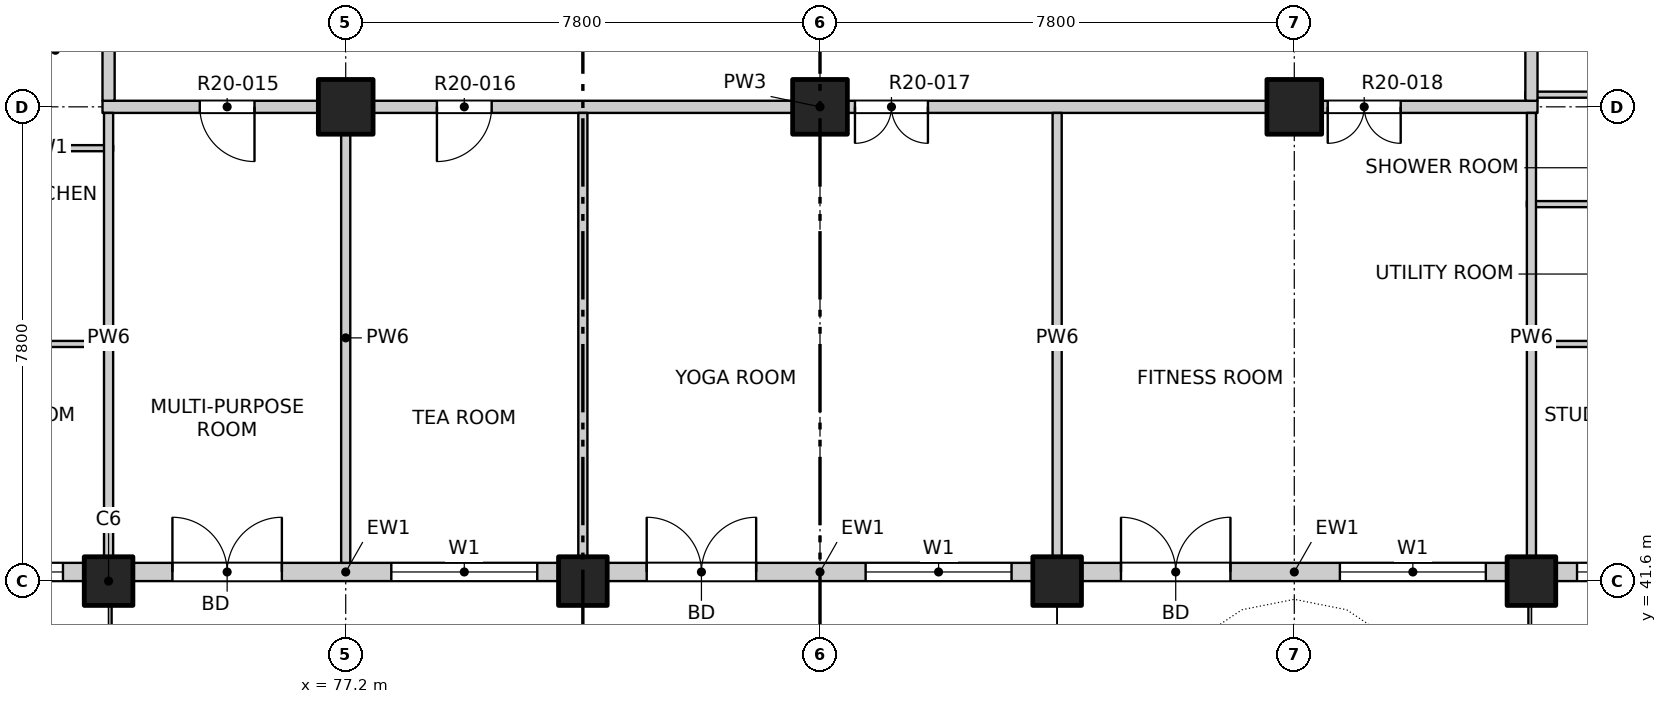
"""IFC4 building model, lengths in metres.
Left out: names, types, materials, properties, quantities, classifications, styles, units other than length and angle.
Written with IfcOpenShell. Run it as: python <this file> out.ifc"""

import sys

from ifc_helpers import new_model, si_unit, direction, frame, frame_2d, origin, origin_2d, place, context, subcontext, project, spatial, rectangle, extrude, element, fill, save


model = new_model("IFC4")
c1 = context("Model", 3, precision=1e-05, world=origin(), true_north=direction((0.0, 1.0)))
c2 = subcontext(c1, "Body", "Model", "MODEL_VIEW")
j1 = project(units=[si_unit("LENGTHUNIT", "METRE"), si_unit("PLANEANGLEUNIT", "RADIAN")], contexts=[c1])
p1 = place(None, origin())
s1 = spatial("IfcSite", under=j1, at=p1, CompositionType="ELEMENT")
p2 = place(p1, origin())
s2 = spatial("IfcBuilding", under=s1, at=p2, CompositionType="ELEMENT")
p3 = place(p2, frame((0.0, 0.0, 210.9)))
s3 = spatial("IfcBuildingStorey", under=s2, at=p3, CompositionType="ELEMENT", Elevation=210.9)
for number, where, z_axis, x_axis in (
    (1, (73.3, 41.6, -0.25), (0.0, 0.0, 1.0), (1.0, 0.0, 0.0)),
    (2, (81.1, 41.6, -0.25), (0.0, 0.0, 1.0), (1.0, 0.0, 0.0)),
    (3, (88.9, 41.6, -0.25), (0.0, 0.0, 1.0), (1.0, 0.0, 0.0)),
    (4, (96.7, 41.6, -0.25), (0.0, 0.0, 1.0), (1.0, 0.0, 0.0)),
):
    element("IfcColumn", number, at=place(p3, frame(where, z_axis=z_axis, x_axis=x_axis)), inside=s3, PredefinedType="COLUMN", context=c2, shape_type="SweptSolid", body=[
        extrude(rectangle(XDim=0.8, YDim=0.8, at=origin_2d()), origin(), (0.0, 0.0, 1.0), 3.4),
    ])
for number, where, z_axis, x_axis in (
    (5, (77.2, 49.4, -0.25), (0.0, 0.0, 1.0), (1.0, 0.0, 0.0)),
    (6, (85.0, 49.4, -0.25), (0.0, 0.0, 1.0), (1.0, 0.0, 0.0)),
    (7, (92.8, 49.4, -0.25), (0.0, 0.0, 1.0), (1.0, 0.0, 0.0)),
):
    element("IfcColumn", number, at=place(p3, frame(where, z_axis=z_axis, x_axis=x_axis)), inside=s3, PredefinedType="COLUMN", context=c2, shape_type="SweptSolid", body=[
        extrude(rectangle(XDim=0.9, YDim=0.9, at=origin_2d()), origin(), (0.0, 0.0, 1.0), 3.4),
    ])
p4 = place(p3, frame((65.5, 41.75, 0.0), z_axis=(0.0, 0.0, 1.0), x_axis=(1.0, 0.0, 0.0)))
e8 = element("IfcWall", 8, at=p4, inside=s3, PredefinedType="SOLIDWALL", context=c2, shape_type="SweptSolid", body=[
    extrude(rectangle(XDim=7.4, YDim=0.3, at=frame_2d((3.7, 0.0))), origin(), (0.0, 0.0, 1.0), 2.7),
])
p5 = place(p4, frame((0.75, 0.0, 0.9)))
e9 = element("IfcOpeningElement", 9, at=p5, cuts=e8, PredefinedType="OPENING", context=c2, shape_type="SweptSolid", body=[
    extrude(rectangle(XDim=2.4, YDim=1.8, at=frame_2d((1.2, 0.9))), frame((0.0, 0.16, 0.0), z_axis=(0.0, -1.0, 0.0), x_axis=(1.0, 0.0, 0.0)), (0.0, 0.0, 1.0), 0.32),
])
p6 = place(p4, frame((4.65, 0.0, 0.9)))
e10 = element("IfcOpeningElement", 10, at=p6, cuts=e8, PredefinedType="OPENING", context=c2, shape_type="SweptSolid", body=[
    extrude(rectangle(XDim=2.4, YDim=1.8, at=frame_2d((1.2, 0.9))), frame((0.0, 0.16, 0.0), z_axis=(0.0, -1.0, 0.0), x_axis=(1.0, 0.0, 0.0)), (0.0, 0.0, 1.0), 0.32),
])
p7 = place(p3, frame((73.7, 41.75, 0.0), z_axis=(0.0, 0.0, 1.0), x_axis=(1.0, 0.0, 0.0)))
e11 = element("IfcWall", 11, at=p7, inside=s3, PredefinedType="SOLIDWALL", context=c2, shape_type="SweptSolid", body=[
    extrude(rectangle(XDim=7.0, YDim=0.3, at=frame_2d((3.5, 0.0))), origin(), (0.0, 0.0, 1.0), 2.7),
])
p8 = place(p7, frame((0.65, 0.0, 0.0)))
e12 = element("IfcOpeningElement", 12, at=p8, cuts=e11, PredefinedType="OPENING", context=c2, shape_type="SweptSolid", body=[
    extrude(rectangle(XDim=1.8, YDim=2.4, at=frame_2d((0.9, 1.2))), frame((0.0, 0.16, 0.0), z_axis=(0.0, -1.0, 0.0), x_axis=(1.0, 0.0, 0.0)), (0.0, 0.0, 1.0), 0.32),
])
p9 = place(p7, frame((4.25, 0.0, 0.9)))
e13 = element("IfcOpeningElement", 13, at=p9, cuts=e11, PredefinedType="OPENING", context=c2, shape_type="SweptSolid", body=[
    extrude(rectangle(XDim=2.4, YDim=1.8, at=frame_2d((1.2, 0.9))), frame((0.0, 0.16, 0.0), z_axis=(0.0, -1.0, 0.0), x_axis=(1.0, 0.0, 0.0)), (0.0, 0.0, 1.0), 0.32),
])
p10 = place(p3, frame((81.5, 41.75, 0.0), z_axis=(0.0, 0.0, 1.0), x_axis=(1.0, 0.0, 0.0)))
e14 = element("IfcWall", 14, at=p10, inside=s3, PredefinedType="SOLIDWALL", context=c2, shape_type="SweptSolid", body=[
    extrude(rectangle(XDim=7.0, YDim=0.3, at=frame_2d((3.5, 0.0))), origin(), (0.0, 0.0, 1.0), 2.7),
])
p11 = place(p10, frame((0.65, 0.0, 0.0)))
e15 = element("IfcOpeningElement", 15, at=p11, cuts=e14, PredefinedType="OPENING", context=c2, shape_type="SweptSolid", body=[
    extrude(rectangle(XDim=1.8, YDim=2.4, at=frame_2d((0.9, 1.2))), frame((0.0, 0.16, 0.0), z_axis=(0.0, -1.0, 0.0), x_axis=(1.0, 0.0, 0.0)), (0.0, 0.0, 1.0), 0.32),
])
p12 = place(p10, frame((4.25, 0.0, 0.9)))
e16 = element("IfcOpeningElement", 16, at=p12, cuts=e14, PredefinedType="OPENING", context=c2, shape_type="SweptSolid", body=[
    extrude(rectangle(XDim=2.4, YDim=1.8, at=frame_2d((1.2, 0.9))), frame((0.0, 0.16, 0.0), z_axis=(0.0, -1.0, 0.0), x_axis=(1.0, 0.0, 0.0)), (0.0, 0.0, 1.0), 0.32),
])
p13 = place(p3, frame((89.3, 41.75, 0.0), z_axis=(0.0, 0.0, 1.0), x_axis=(1.0, 0.0, 0.0)))
e17 = element("IfcWall", 17, at=p13, inside=s3, PredefinedType="SOLIDWALL", context=c2, shape_type="SweptSolid", body=[
    extrude(rectangle(XDim=7.0, YDim=0.3, at=frame_2d((3.5, 0.0))), origin(), (0.0, 0.0, 1.0), 2.7),
])
p14 = place(p13, frame((0.65, 0.0, 0.0)))
e18 = element("IfcOpeningElement", 18, at=p14, cuts=e17, PredefinedType="OPENING", context=c2, shape_type="SweptSolid", body=[
    extrude(rectangle(XDim=1.8, YDim=2.4, at=frame_2d((0.9, 1.2))), frame((0.0, 0.16, 0.0), z_axis=(0.0, -1.0, 0.0), x_axis=(1.0, 0.0, 0.0)), (0.0, 0.0, 1.0), 0.32),
])
p15 = place(p13, frame((4.25, 0.0, 0.9)))
e19 = element("IfcOpeningElement", 19, at=p15, cuts=e17, PredefinedType="OPENING", context=c2, shape_type="SweptSolid", body=[
    extrude(rectangle(XDim=2.4, YDim=1.8, at=frame_2d((1.2, 0.9))), frame((0.0, 0.16, 0.0), z_axis=(0.0, -1.0, 0.0), x_axis=(1.0, 0.0, 0.0)), (0.0, 0.0, 1.0), 0.32),
])
p16 = place(p3, frame((97.1, 41.75, 0.0), z_axis=(0.0, 0.0, 1.0), x_axis=(1.0, 0.0, 0.0)))
e20 = element("IfcWall", 20, at=p16, inside=s3, PredefinedType="SOLIDWALL", context=c2, shape_type="SweptSolid", body=[
    extrude(rectangle(XDim=7.4, YDim=0.3, at=frame_2d((3.7, 0.0))), origin(), (0.0, 0.0, 1.0), 2.7),
])
p17 = place(p16, frame((0.35, 0.0, 0.9)))
e21 = element("IfcOpeningElement", 21, at=p17, cuts=e20, PredefinedType="OPENING", context=c2, shape_type="SweptSolid", body=[
    extrude(rectangle(XDim=2.4, YDim=1.8, at=frame_2d((1.2, 0.9))), frame((0.0, 0.16, 0.0), z_axis=(0.0, -1.0, 0.0), x_axis=(1.0, 0.0, 0.0)), (0.0, 0.0, 1.0), 0.32),
])
p18 = place(p16, frame((4.25, 0.0, 0.9)))
e22 = element("IfcOpeningElement", 22, at=p18, cuts=e20, PredefinedType="OPENING", context=c2, shape_type="SweptSolid", body=[
    extrude(rectangle(XDim=2.4, YDim=1.8, at=frame_2d((1.2, 0.9))), frame((0.0, 0.16, 0.0), z_axis=(0.0, -1.0, 0.0), x_axis=(1.0, 0.0, 0.0)), (0.0, 0.0, 1.0), 0.32),
])
p19 = place(p3, frame((61.9, 45.5, 0.0), z_axis=(0.0, 0.0, 1.0), x_axis=(1.0, 0.0, 0.0)))
e23 = element("IfcWall", 23, at=p19, inside=s3, PredefinedType="PARTITIONING", context=c2, shape_type="SweptSolid", body=[
    extrude(rectangle(XDim=11.475, YDim=0.1, at=frame_2d((5.737, 0.0))), origin(), (0.0, 0.0, 1.0), 3.15),
])
p20 = place(p19, frame((7.965, 0.0, 0.0)))
e24 = element("IfcOpeningElement", 24, at=p20, cuts=e23, PredefinedType="OPENING", context=c2, shape_type="SweptSolid", body=[
    extrude(rectangle(XDim=0.9, YDim=2.1, at=frame_2d((0.45, 1.05))), frame((0.0, 0.06, 0.0), z_axis=(0.0, -1.0, 0.0), x_axis=(1.0, 0.0, 0.0)), (0.0, 0.0, 1.0), 0.12),
])
p21 = place(p3, frame((96.625, 45.5, 0.0), z_axis=(0.0, 0.0, 1.0), x_axis=(1.0, 0.0, 0.0)))
e25 = element("IfcWall", 25, at=p21, inside=s3, PredefinedType="PARTITIONING", context=c2, shape_type="SweptSolid", body=[
    extrude(rectangle(XDim=11.475, YDim=0.1, at=frame_2d((5.738, 0.0))), origin(), (0.0, 0.0, 1.0), 3.15),
])
p22 = place(p21, frame((2.61, 0.0, 0.0)))
e26 = element("IfcOpeningElement", 26, at=p22, cuts=e25, PredefinedType="OPENING", context=c2, shape_type="SweptSolid", body=[
    extrude(rectangle(XDim=0.9, YDim=2.1, at=frame_2d((0.45, 1.05))), frame((0.0, 0.06, 0.0), z_axis=(0.0, -1.0, 0.0), x_axis=(1.0, 0.0, 0.0)), (0.0, 0.0, 1.0), 0.12),
])
p23 = place(p3, frame((96.625, 47.8, 0.0), z_axis=(0.0, 0.0, 1.0), x_axis=(1.0, 0.0, 0.0)))
e27 = element("IfcWall", 27, at=p23, inside=s3, PredefinedType="PARTITIONING", context=c2, shape_type="SweptSolid", body=[
    extrude(rectangle(XDim=2.195, YDim=0.1, at=frame_2d((1.098, 0.0))), origin(), (0.0, 0.0, 1.0), 3.15),
])
p24 = place(p3, frame((71.18, 48.72, 0.0), z_axis=(0.0, 0.0, 1.0), x_axis=(1.0, 0.0, 0.0)))
e28 = element("IfcWall", 28, at=p24, inside=s3, PredefinedType="PARTITIONING", context=c2, shape_type="SweptSolid", body=[
    extrude(rectangle(XDim=2.195, YDim=0.1, at=frame_2d((1.097, 0.0))), origin(), (0.0, 0.0, 1.0), 3.15),
])
p25 = place(p3, frame((73.2, 49.4, 0.0), z_axis=(0.0, 0.0, 1.0), x_axis=(1.0, 0.0, 0.0)))
e29 = element("IfcWall", 29, at=p25, inside=s3, PredefinedType="PARTITIONING", context=c2, shape_type="SweptSolid", body=[
    extrude(rectangle(XDim=23.6, YDim=0.2, at=frame_2d((11.8, 0.0))), origin(), (0.0, 0.0, 1.0), 3.15),
])
p26 = place(p25, frame((1.6, 0.0, 0.0)))
e30 = element("IfcOpeningElement", 30, at=p26, cuts=e29, PredefinedType="OPENING", context=c2, shape_type="SweptSolid", body=[
    extrude(rectangle(XDim=0.9, YDim=2.1, at=frame_2d((0.45, 1.05))), frame((0.0, 0.11, 0.0), z_axis=(0.0, -1.0, 0.0), x_axis=(1.0, 0.0, 0.0)), (0.0, 0.0, 1.0), 0.22),
])
p27 = place(p25, frame((5.5, 0.0, 0.0)))
e31 = element("IfcOpeningElement", 31, at=p27, cuts=e29, PredefinedType="OPENING", context=c2, shape_type="SweptSolid", body=[
    extrude(rectangle(XDim=0.9, YDim=2.1, at=frame_2d((0.45, 1.05))), frame((0.0, 0.11, 0.0), z_axis=(0.0, -1.0, 0.0), x_axis=(1.0, 0.0, 0.0)), (0.0, 0.0, 1.0), 0.22),
])
p28 = place(p25, frame((12.375, 0.0, 0.0)))
e32 = element("IfcOpeningElement", 32, at=p28, cuts=e29, PredefinedType="OPENING", context=c2, shape_type="SweptSolid", body=[
    extrude(rectangle(XDim=1.2, YDim=2.1, at=frame_2d((0.6, 1.05))), frame((0.0, 0.11, 0.0), z_axis=(0.0, -1.0, 0.0), x_axis=(1.0, 0.0, 0.0)), (0.0, 0.0, 1.0), 0.22),
])
p29 = place(p25, frame((20.15, 0.0, 0.0)))
e33 = element("IfcOpeningElement", 33, at=p29, cuts=e29, PredefinedType="OPENING", context=c2, shape_type="SweptSolid", body=[
    extrude(rectangle(XDim=1.2, YDim=2.1, at=frame_2d((0.6, 1.05))), frame((0.0, 0.11, 0.0), z_axis=(0.0, -1.0, 0.0), x_axis=(1.0, 0.0, 0.0)), (0.0, 0.0, 1.0), 0.22),
])
p30 = place(p3, frame((96.6, 49.6, 0.0), z_axis=(0.0, 0.0, 1.0), x_axis=(1.0, 0.0, 0.0)))
e34 = element("IfcWall", 34, at=p30, inside=s3, PredefinedType="PARTITIONING", context=c2, shape_type="SweptSolid", body=[
    extrude(rectangle(XDim=2.22, YDim=0.1, at=frame_2d((1.11, 0.0))), origin(), (0.0, 0.0, 1.0), 3.15),
])
p31 = place(p3, frame((73.3, 41.9, 0.0), z_axis=(0.0, 0.0, 1.0), x_axis=(0.0, 1.0, 0.0)))
e35 = element("IfcWall", 35, at=p31, inside=s3, PredefinedType="PARTITIONING", context=c2, shape_type="SweptSolid", body=[
    extrude(rectangle(XDim=7.4, YDim=0.15, at=frame_2d((3.7, 0.0))), origin(), (0.0, 0.0, 1.0), 3.15),
])
p32 = place(p3, frame((73.3, 49.5, 0.0), z_axis=(0.0, 0.0, 1.0), x_axis=(0.0, 1.0, 0.0)))
e36 = element("IfcWall", 36, at=p32, inside=s3, PredefinedType="PARTITIONING", context=c2, shape_type="SweptSolid", body=[
    extrude(rectangle(XDim=34.9, YDim=0.2, at=frame_2d((17.45, 0.0))), origin(), (0.0, 0.0, 1.0), 3.15),
])
p33 = place(p32, frame((3.225, 0.0, 0.0)))
e37 = element("IfcOpeningElement", 37, at=p33, cuts=e36, PredefinedType="OPENING", context=c2, shape_type="SweptSolid", body=[
    extrude(rectangle(XDim=1.0, YDim=2.1, at=frame_2d((0.5, 1.05))), frame((0.0, 0.11, 0.0), z_axis=(0.0, -1.0, 0.0), x_axis=(1.0, 0.0, 0.0)), (0.0, 0.0, 1.0), 0.22),
])
p34 = place(p32, frame((25.125, 0.0, 0.0)))
e38 = element("IfcOpeningElement", 38, at=p34, cuts=e36, PredefinedType="OPENING", context=c2, shape_type="SweptSolid", body=[
    extrude(rectangle(XDim=1.0, YDim=2.1, at=frame_2d((0.5, 1.05))), frame((0.0, 0.11, 0.0), z_axis=(0.0, -1.0, 0.0), x_axis=(1.0, 0.0, 0.0)), (0.0, 0.0, 1.0), 0.22),
])
p35 = place(p32, frame((31.475, 0.0, 0.0)))
e39 = element("IfcOpeningElement", 39, at=p35, cuts=e36, PredefinedType="OPENING", context=c2, shape_type="SweptSolid", body=[
    extrude(rectangle(XDim=1.0, YDim=2.1, at=frame_2d((0.5, 1.05))), frame((0.0, 0.11, 0.0), z_axis=(0.0, -1.0, 0.0), x_axis=(1.0, 0.0, 0.0)), (0.0, 0.0, 1.0), 0.22),
])
p36 = place(p3, frame((77.2, 41.9, 0.0), z_axis=(0.0, 0.0, 1.0), x_axis=(0.0, 1.0, 0.0)))
e40 = element("IfcWall", 40, at=p36, inside=s3, PredefinedType="PARTITIONING", context=c2, shape_type="SweptSolid", body=[
    extrude(rectangle(XDim=7.4, YDim=0.15, at=frame_2d((3.7, 0.0))), origin(), (0.0, 0.0, 1.0), 3.15),
])
for number, where, z_axis, x_axis in (
    (41, (81.1, 41.9, 0.0), (0.0, 0.0, 1.0), (0.0, 1.0, 0.0)),
    (42, (88.9, 41.9, 0.0), (0.0, 0.0, 1.0), (0.0, 1.0, 0.0)),
):
    element("IfcWall", number, at=place(p3, frame(where, z_axis=z_axis, x_axis=x_axis)), inside=s3, PredefinedType="PARTITIONING", context=c2, shape_type="SweptSolid", body=[
        extrude(rectangle(XDim=7.4, YDim=0.15, at=frame_2d((3.7, 0.0))), origin(), (0.0, 0.0, 1.0), 2.55),
    ])
p37 = place(p3, frame((96.7, 41.9, 0.0), z_axis=(0.0, 0.0, 1.0), x_axis=(0.0, 1.0, 0.0)))
e43 = element("IfcWall", 43, at=p37, inside=s3, PredefinedType="PARTITIONING", context=c2, shape_type="SweptSolid", body=[
    extrude(rectangle(XDim=7.4, YDim=0.15, at=frame_2d((3.7, 0.0))), origin(), (0.0, 0.0, 1.0), 3.15),
])
p38 = place(p3, frame((96.7, 49.5, 0.0), z_axis=(0.0, 0.0, 1.0), x_axis=(0.0, 1.0, 0.0)))
e44 = element("IfcWall", 44, at=p38, inside=s3, PredefinedType="PARTITIONING", context=c2, shape_type="SweptSolid", body=[
    extrude(rectangle(XDim=34.9, YDim=0.2, at=frame_2d((17.45, 0.0))), origin(), (0.0, 0.0, 1.0), 3.15),
])
p39 = place(p38, frame((9.625, 0.0, 0.0)))
e45 = element("IfcOpeningElement", 45, at=p39, cuts=e44, PredefinedType="OPENING", context=c2, shape_type="SweptSolid", body=[
    extrude(rectangle(XDim=1.0, YDim=2.1, at=frame_2d((0.5, 1.05))), frame((0.0, 0.11, 0.0), z_axis=(0.0, -1.0, 0.0), x_axis=(1.0, 0.0, 0.0)), (0.0, 0.0, 1.0), 0.22),
])
p40 = place(p38, frame((14.125, 0.0, 0.0)))
e46 = element("IfcOpeningElement", 46, at=p40, cuts=e44, PredefinedType="OPENING", context=c2, shape_type="SweptSolid", body=[
    extrude(rectangle(XDim=1.0, YDim=2.1, at=frame_2d((0.5, 1.05))), frame((0.0, 0.11, 0.0), z_axis=(0.0, -1.0, 0.0), x_axis=(1.0, 0.0, 0.0)), (0.0, 0.0, 1.0), 0.22),
])
p41 = place(p38, frame((29.275, 0.0, 0.0)))
e47 = element("IfcOpeningElement", 47, at=p41, cuts=e44, PredefinedType="OPENING", context=c2, shape_type="SweptSolid", body=[
    extrude(rectangle(XDim=1.0, YDim=2.1, at=frame_2d((0.5, 1.05))), frame((0.0, 0.11, 0.0), z_axis=(0.0, -1.0, 0.0), x_axis=(1.0, 0.0, 0.0)), (0.0, 0.0, 1.0), 0.22),
])
p42 = place(p6, origin())
e48 = element("IfcWindow", 48, at=p42, inside=s3, PartitioningType="DOUBLE_PANEL_VERTICAL", PredefinedType="WINDOW", context=c2, shape_type="SweptSolid", body=[
    extrude(rectangle(XDim=2.4, YDim=1.8, at=frame_2d((1.2, 0.9))), frame((0.0, 0.03, 0.0), z_axis=(0.0, -1.0, 0.0), x_axis=(1.0, 0.0, 0.0)), (0.0, 0.0, 1.0), 0.06),
])
fill(e10, e48)
p43 = place(p8, origin())
e49 = element("IfcDoor", 49, at=p43, inside=s3, OperationType="DOUBLE_DOOR_SINGLE_SWING", PredefinedType="DOOR", context=c2, shape_type="SweptSolid", body=[
    extrude(rectangle(XDim=1.8, YDim=2.4, at=frame_2d((0.9, 1.2))), frame((0.0, 0.025, 0.0), z_axis=(0.0, -1.0, 0.0), x_axis=(1.0, 0.0, 0.0)), (0.0, 0.0, 1.0), 0.05),
])
fill(e12, e49)
p44 = place(p9, origin())
e50 = element("IfcWindow", 50, at=p44, inside=s3, PartitioningType="DOUBLE_PANEL_VERTICAL", PredefinedType="WINDOW", context=c2, shape_type="SweptSolid", body=[
    extrude(rectangle(XDim=2.4, YDim=1.8, at=frame_2d((1.2, 0.9))), frame((0.0, 0.03, 0.0), z_axis=(0.0, -1.0, 0.0), x_axis=(1.0, 0.0, 0.0)), (0.0, 0.0, 1.0), 0.06),
])
fill(e13, e50)
p45 = place(p11, origin())
e51 = element("IfcDoor", 51, at=p45, inside=s3, OperationType="DOUBLE_DOOR_SINGLE_SWING", PredefinedType="DOOR", context=c2, shape_type="SweptSolid", body=[
    extrude(rectangle(XDim=1.8, YDim=2.4, at=frame_2d((0.9, 1.2))), frame((0.0, 0.025, 0.0), z_axis=(0.0, -1.0, 0.0), x_axis=(1.0, 0.0, 0.0)), (0.0, 0.0, 1.0), 0.05),
])
fill(e15, e51)
p46 = place(p12, origin())
e52 = element("IfcWindow", 52, at=p46, inside=s3, PartitioningType="DOUBLE_PANEL_VERTICAL", PredefinedType="WINDOW", context=c2, shape_type="SweptSolid", body=[
    extrude(rectangle(XDim=2.4, YDim=1.8, at=frame_2d((1.2, 0.9))), frame((0.0, 0.03, 0.0), z_axis=(0.0, -1.0, 0.0), x_axis=(1.0, 0.0, 0.0)), (0.0, 0.0, 1.0), 0.06),
])
fill(e16, e52)
p47 = place(p14, origin())
e53 = element("IfcDoor", 53, at=p47, inside=s3, OperationType="DOUBLE_DOOR_SINGLE_SWING", PredefinedType="DOOR", context=c2, shape_type="SweptSolid", body=[
    extrude(rectangle(XDim=1.8, YDim=2.4, at=frame_2d((0.9, 1.2))), frame((0.0, 0.025, 0.0), z_axis=(0.0, -1.0, 0.0), x_axis=(1.0, 0.0, 0.0)), (0.0, 0.0, 1.0), 0.05),
])
fill(e18, e53)
p48 = place(p15, origin())
e54 = element("IfcWindow", 54, at=p48, inside=s3, PartitioningType="DOUBLE_PANEL_VERTICAL", PredefinedType="WINDOW", context=c2, shape_type="SweptSolid", body=[
    extrude(rectangle(XDim=2.4, YDim=1.8, at=frame_2d((1.2, 0.9))), frame((0.0, 0.03, 0.0), z_axis=(0.0, -1.0, 0.0), x_axis=(1.0, 0.0, 0.0)), (0.0, 0.0, 1.0), 0.06),
])
fill(e19, e54)
p49 = place(p17, origin())
e55 = element("IfcWindow", 55, at=p49, inside=s3, PartitioningType="DOUBLE_PANEL_VERTICAL", PredefinedType="WINDOW", context=c2, shape_type="SweptSolid", body=[
    extrude(rectangle(XDim=2.4, YDim=1.8, at=frame_2d((1.2, 0.9))), frame((0.0, 0.03, 0.0), z_axis=(0.0, -1.0, 0.0), x_axis=(1.0, 0.0, 0.0)), (0.0, 0.0, 1.0), 0.06),
])
fill(e21, e55)
p50 = place(p26, origin())
e56 = element("IfcDoor", 56, at=p50, inside=s3, OperationType="SINGLE_SWING_LEFT", PredefinedType="DOOR", context=c2, shape_type="SweptSolid", body=[
    extrude(rectangle(XDim=0.9, YDim=2.1, at=frame_2d((0.45, 1.05))), frame((0.0, 0.025, 0.0), z_axis=(0.0, -1.0, 0.0), x_axis=(1.0, 0.0, 0.0)), (0.0, 0.0, 1.0), 0.05),
])
fill(e30, e56)
p51 = place(p27, origin())
e57 = element("IfcDoor", 57, at=p51, inside=s3, OperationType="SINGLE_SWING_RIGHT", PredefinedType="DOOR", context=c2, shape_type="SweptSolid", body=[
    extrude(rectangle(XDim=0.9, YDim=2.1, at=frame_2d((0.45, 1.05))), frame((0.0, 0.025, 0.0), z_axis=(0.0, -1.0, 0.0), x_axis=(1.0, 0.0, 0.0)), (0.0, 0.0, 1.0), 0.05),
])
fill(e31, e57)
p52 = place(p28, origin())
e58 = element("IfcDoor", 58, at=p52, inside=s3, OperationType="DOUBLE_DOOR_SINGLE_SWING", PredefinedType="DOOR", context=c2, shape_type="SweptSolid", body=[
    extrude(rectangle(XDim=1.2, YDim=2.1, at=frame_2d((0.6, 1.05))), frame((0.0, 0.025, 0.0), z_axis=(0.0, -1.0, 0.0), x_axis=(1.0, 0.0, 0.0)), (0.0, 0.0, 1.0), 0.05),
])
fill(e32, e58)
p53 = place(p29, origin())
e59 = element("IfcDoor", 59, at=p53, inside=s3, OperationType="DOUBLE_DOOR_SINGLE_SWING", PredefinedType="DOOR", context=c2, shape_type="SweptSolid", body=[
    extrude(rectangle(XDim=1.2, YDim=2.1, at=frame_2d((0.6, 1.05))), frame((0.0, 0.025, 0.0), z_axis=(0.0, -1.0, 0.0), x_axis=(1.0, 0.0, 0.0)), (0.0, 0.0, 1.0), 0.05),
])
fill(e33, e59)
save(model, sys.argv[1])
